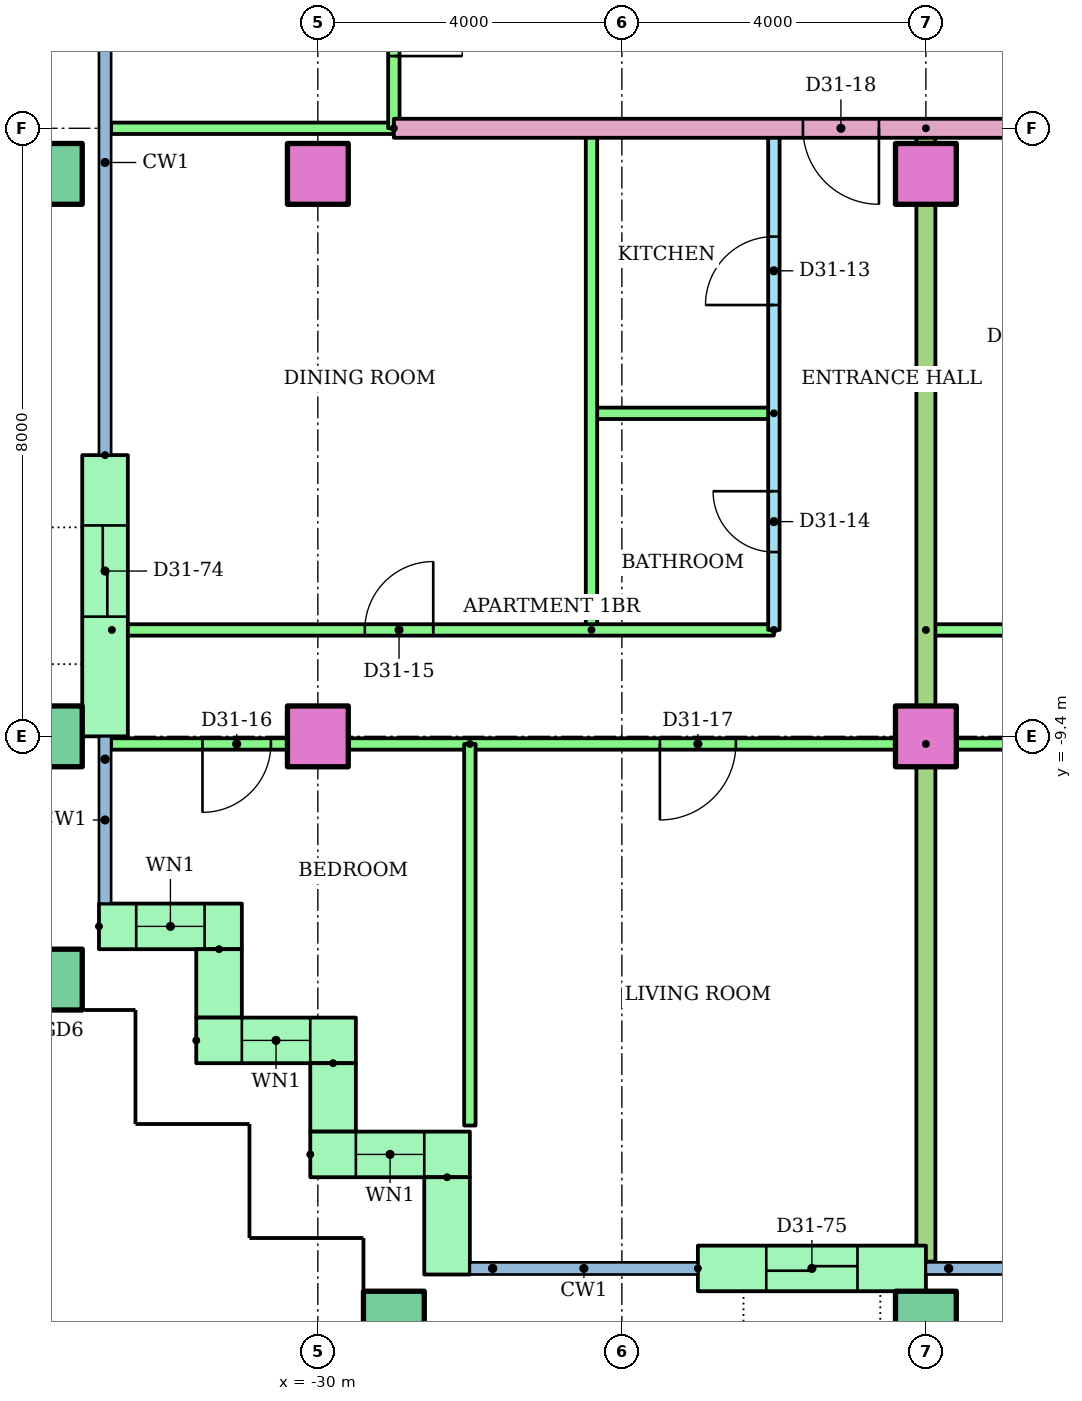
"""IFC4 building model, lengths in metres.
Left out: names, types, materials, properties, quantities, classifications, styles, units other than length and angle.
Written with IfcOpenShell. Run it as: python <this file> out.ifc"""

import sys

from ifc_helpers import new_model, si_unit, direction, frame, frame_2d, origin, origin_2d, place, context, subcontext, project, spatial, rectangle, hollow_rectangle, extrude, element, fill, save


model = new_model("IFC4")
c1 = context("Model", 3, precision=1e-05, world=origin(), true_north=direction((0.0, 1.0)))
c2 = subcontext(c1, "Body", "Model", "MODEL_VIEW")
j1 = project(units=[si_unit("LENGTHUNIT", "METRE"), si_unit("PLANEANGLEUNIT", "RADIAN")], contexts=[c1])
p1 = place(None, origin())
s1 = spatial("IfcSite", under=j1, at=p1, CompositionType="ELEMENT")
p2 = place(p1, origin())
s2 = spatial("IfcBuilding", under=s1, at=p2, CompositionType="ELEMENT")
p3 = place(p2, frame((0.0, 0.0, 123.0)))
s3 = spatial("IfcBuildingStorey", under=s2, at=p3, CompositionType="ELEMENT", Elevation=123.0)
for number, where in (
    (1, (-29.0, -17.1, 0.0)),
    (2, (-22.0, -17.1, 0.0)),
    (3, (-33.5, -12.6, 0.0)),
    (4, (-33.5, -9.4, 0.0)),
):
    element("IfcColumn", number, at=place(p3, frame(where)), inside=s3, PredefinedType="COLUMN", context=c2, shape_type="SweptSolid", body=[
        extrude(hollow_rectangle(XDim=0.8, YDim=0.8, WallThickness=0.04, at=origin_2d()), origin(), (0.0, 0.0, 1.0), 3.2),
    ])
for number, where in (
    (5, (-30.0, -9.4, 0.0)),
    (6, (-22.0, -9.4, 0.0)),
):
    element("IfcColumn", number, at=place(p3, frame(where)), inside=s3, PredefinedType="COLUMN", context=c2, shape_type="SweptSolid", body=[
        extrude(rectangle(XDim=0.8, YDim=0.8, at=origin_2d()), origin(), (0.0, 0.0, 1.0), 3.2),
    ])
p4 = place(p3, frame((-33.5, -2.0, 0.0)))
e7 = element("IfcColumn", 7, at=p4, inside=s3, PredefinedType="COLUMN", context=c2, shape_type="SweptSolid", body=[
    extrude(hollow_rectangle(XDim=0.8, YDim=0.8, WallThickness=0.04, at=origin_2d()), origin(), (0.0, 0.0, 1.0), 3.2),
])
for number, where in (
    (8, (-30.0, -2.0, 0.0)),
    (9, (-22.0, -2.0, 0.0)),
):
    element("IfcColumn", number, at=place(p3, frame(where)), inside=s3, PredefinedType="COLUMN", context=c2, shape_type="SweptSolid", body=[
        extrude(rectangle(XDim=0.8, YDim=0.8, at=origin_2d()), origin(), (0.0, 0.0, 1.0), 3.2),
    ])
p5 = place(p3, frame((-32.8, -5.7, 0.0), z_axis=(0.0, 0.0, 1.0), x_axis=(0.0, -1.0, 0.0)))
e10 = element("IfcWall", 10, at=p5, inside=s3, PredefinedType="STANDARD", context=c2, shape_type="SweptSolid", body=[
    extrude(rectangle(XDim=3.7, YDim=0.6, at=frame_2d((1.85, 0.0))), origin(), (0.0, 0.0, 1.0), 2.92),
])
p6 = place(p5, frame((0.925, 0.0, 0.0)))
e11 = element("IfcOpeningElement", 11, at=p6, cuts=e10, PredefinedType="OPENING", context=c2, shape_type="SweptSolid", body=[
    extrude(rectangle(XDim=1.2, YDim=2.1, at=frame_2d((0.6, 1.05))), frame((0.0, 0.31, 0.0), z_axis=(0.0, -1.0, 0.0), x_axis=(1.0, 0.0, 0.0)), (0.0, 0.0, 1.0), 0.62),
])
p7 = place(p3, frame((-32.88, -11.9, 0.0)))
e12 = element("IfcWall", 12, at=p7, inside=s3, PredefinedType="STANDARD", context=c2, shape_type="SweptSolid", body=[
    extrude(rectangle(XDim=1.88, YDim=0.6, at=frame_2d((0.94, 0.0))), origin(), (0.0, 0.0, 1.0), 2.92),
])
p8 = place(p7, frame((0.49, 0.0, 0.9)))
e13 = element("IfcOpeningElement", 13, at=p8, cuts=e12, PredefinedType="OPENING", context=c2, shape_type="SweptSolid", body=[
    extrude(rectangle(XDim=0.9, YDim=1.5, at=frame_2d((0.45, 0.75))), frame((0.0, 0.31, 0.0), z_axis=(0.0, -1.0, 0.0), x_axis=(1.0, 0.0, 0.0)), (0.0, 0.0, 1.0), 0.62),
])
p9 = place(p3, frame((-31.3, -12.2, 0.0), z_axis=(0.0, 0.0, 1.0), x_axis=(0.0, -1.0, 0.0)))
e14 = element("IfcWall", 14, at=p9, inside=s3, PredefinedType="STANDARD", context=c2, shape_type="SweptSolid", body=[
    extrude(rectangle(XDim=0.9, YDim=0.6, at=frame_2d((0.45, 0.0))), origin(), (0.0, 0.0, 1.0), 2.92),
])
p10 = place(p3, frame((-31.6, -13.4, 0.0)))
e15 = element("IfcWall", 15, at=p10, inside=s3, PredefinedType="STANDARD", context=c2, shape_type="SweptSolid", body=[
    extrude(rectangle(XDim=2.1, YDim=0.6, at=frame_2d((1.05, 0.0))), origin(), (0.0, 0.0, 1.0), 2.92),
])
p11 = place(p10, frame((0.6, 0.0, 0.9)))
e16 = element("IfcOpeningElement", 16, at=p11, cuts=e15, PredefinedType="OPENING", context=c2, shape_type="SweptSolid", body=[
    extrude(rectangle(XDim=0.9, YDim=1.5, at=frame_2d((0.45, 0.75))), frame((0.0, 0.31, 0.0), z_axis=(0.0, -1.0, 0.0), x_axis=(1.0, 0.0, 0.0)), (0.0, 0.0, 1.0), 0.62),
])
p12 = place(p3, frame((-29.8, -13.7, 0.0), z_axis=(0.0, 0.0, 1.0), x_axis=(0.0, -1.0, 0.0)))
e17 = element("IfcWall", 17, at=p12, inside=s3, PredefinedType="STANDARD", context=c2, shape_type="SweptSolid", body=[
    extrude(rectangle(XDim=0.9, YDim=0.6, at=frame_2d((0.45, 0.0))), origin(), (0.0, 0.0, 1.0), 2.92),
])
p13 = place(p3, frame((-30.1, -14.9, 0.0)))
e18 = element("IfcWall", 18, at=p13, inside=s3, PredefinedType="STANDARD", context=c2, shape_type="SweptSolid", body=[
    extrude(rectangle(XDim=2.1, YDim=0.6, at=frame_2d((1.05, 0.0))), origin(), (0.0, 0.0, 1.0), 2.92),
])
p14 = place(p13, frame((0.6, 0.0, 0.9)))
e19 = element("IfcOpeningElement", 19, at=p14, cuts=e18, PredefinedType="OPENING", context=c2, shape_type="SweptSolid", body=[
    extrude(rectangle(XDim=0.9, YDim=1.5, at=frame_2d((0.45, 0.75))), frame((0.0, 0.31, 0.0), z_axis=(0.0, -1.0, 0.0), x_axis=(1.0, 0.0, 0.0)), (0.0, 0.0, 1.0), 0.62),
])
p15 = place(p3, frame((-28.3, -15.2, 0.0), z_axis=(0.0, 0.0, 1.0), x_axis=(0.0, -1.0, 0.0)))
e20 = element("IfcWall", 20, at=p15, inside=s3, PredefinedType="STANDARD", context=c2, shape_type="SweptSolid", body=[
    extrude(rectangle(XDim=1.28, YDim=0.6, at=frame_2d((0.64, 0.0))), origin(), (0.0, 0.0, 1.0), 2.92),
])
p16 = place(p3, frame((-25.0, -16.4, 0.0)))
e21 = element("IfcWall", 21, at=p16, inside=s3, PredefinedType="STANDARD", context=c2, shape_type="SweptSolid", body=[
    extrude(rectangle(XDim=3.0, YDim=0.6, at=frame_2d((1.5, 0.0))), origin(), (0.0, 0.0, 1.0), 2.92),
])
p17 = place(p16, frame((0.9, 0.0, 0.0)))
e22 = element("IfcOpeningElement", 22, at=p17, cuts=e21, PredefinedType="OPENING", context=c2, shape_type="SweptSolid", body=[
    extrude(rectangle(XDim=1.2, YDim=2.1, at=frame_2d((0.6, 1.05))), frame((0.0, 0.31, 0.0), z_axis=(0.0, -1.0, 0.0), x_axis=(1.0, 0.0, 0.0)), (0.0, 0.0, 1.0), 0.62),
])
p18 = place(p3, frame((-24.0, -8.0, 0.0), z_axis=(0.0, 0.0, 1.0), x_axis=(0.0, 1.0, 0.0)))
e23 = element("IfcWall", 23, at=p18, inside=s3, PredefinedType="PARTITIONING", context=c2, shape_type="SweptSolid", body=[
    extrude(rectangle(XDim=6.6, YDim=0.15, at=frame_2d((3.3, 0.0))), origin(), (0.0, 0.0, 1.0), 2.4),
])
p19 = place(p18, frame((4.275, 0.0, 0.0)))
e24 = element("IfcOpeningElement", 24, at=p19, cuts=e23, PredefinedType="OPENING", context=c2, shape_type="SweptSolid", body=[
    extrude(rectangle(XDim=0.9, YDim=2.1, at=frame_2d((0.45, 1.05))), frame((0.0, 0.085, 0.0), z_axis=(0.0, -1.0, 0.0), x_axis=(1.0, 0.0, 0.0)), (0.0, 0.0, 1.0), 0.17),
])
p20 = place(p18, frame((1.025, 0.0, 0.0)))
e25 = element("IfcOpeningElement", 25, at=p20, cuts=e23, PredefinedType="OPENING", context=c2, shape_type="SweptSolid", body=[
    extrude(rectangle(XDim=0.8, YDim=2.1, at=frame_2d((0.4, 1.05))), frame((0.0, 0.085, 0.0), z_axis=(0.0, -1.0, 0.0), x_axis=(1.0, 0.0, 0.0)), (0.0, 0.0, 1.0), 0.17),
])
p21 = place(p3, frame((-24.0, -5.15, 0.0), z_axis=(0.0, 0.0, 1.0), x_axis=(-1.0, 0.0, 0.0)))
e26 = element("IfcWall", 26, at=p21, inside=s3, PredefinedType="PARTITIONING", context=c2, shape_type="SweptSolid", body=[
    extrude(rectangle(XDim=2.4, YDim=0.15, at=frame_2d((1.2, 0.0))), origin(), (0.0, 0.0, 1.0), 2.4),
])
p22 = place(p3, frame((-26.4, -8.0, 0.0), z_axis=(0.0, 0.0, 1.0), x_axis=(0.0, 1.0, 0.0)))
e27 = element("IfcWall", 27, at=p22, inside=s3, PredefinedType="PARTITIONING", context=c2, shape_type="SweptSolid", body=[
    extrude(rectangle(XDim=6.6, YDim=0.15, at=frame_2d((3.3, 0.0))), origin(), (0.0, 0.0, 1.0), 2.4),
])
p23 = place(p3, frame((-32.71, -8.0, 0.0)))
e28 = element("IfcWall", 28, at=p23, inside=s3, PredefinedType="PARTITIONING", context=c2, shape_type="SweptSolid", body=[
    extrude(rectangle(XDim=8.71, YDim=0.15, at=frame_2d((4.355, 0.0))), origin(), (0.0, 0.0, 1.0), 2.4),
])
p24 = place(p23, frame((3.328, 0.0, 0.0)))
e29 = element("IfcOpeningElement", 29, at=p24, cuts=e28, PredefinedType="OPENING", context=c2, shape_type="SweptSolid", body=[
    extrude(rectangle(XDim=0.9, YDim=2.1, at=frame_2d((0.45, 1.05))), frame((0.0, 0.085, 0.0), z_axis=(0.0, -1.0, 0.0), x_axis=(1.0, 0.0, 0.0)), (0.0, 0.0, 1.0), 0.17),
])
p25 = place(p3, frame((-22.0, -9.5, 0.0), z_axis=(0.0, 0.0, 1.0), x_axis=(-1.0, 0.0, 0.0)))
e30 = element("IfcWall", 30, at=p25, inside=s3, PredefinedType="PARTITIONING", context=c2, shape_type="SweptSolid", body=[
    extrude(rectangle(XDim=10.72, YDim=0.15, at=frame_2d((5.36, 0.0))), origin(), (0.0, 0.0, 1.0), 2.4),
])
p26 = place(p25, frame((8.618, 0.0, 0.0)))
e31 = element("IfcOpeningElement", 31, at=p26, cuts=e30, PredefinedType="OPENING", context=c2, shape_type="SweptSolid", body=[
    extrude(rectangle(XDim=0.9, YDim=2.1, at=frame_2d((0.45, 1.05))), frame((0.0, 0.085, 0.0), z_axis=(0.0, -1.0, 0.0), x_axis=(1.0, 0.0, 0.0)), (0.0, 0.0, 1.0), 0.17),
])
p27 = place(p25, frame((2.5, 0.0, 0.0)))
e32 = element("IfcOpeningElement", 32, at=p27, cuts=e30, PredefinedType="OPENING", context=c2, shape_type="SweptSolid", body=[
    extrude(rectangle(XDim=1.0, YDim=2.1, at=frame_2d((0.5, 1.05))), frame((0.0, 0.085, 0.0), z_axis=(0.0, -1.0, 0.0), x_axis=(1.0, 0.0, 0.0)), (0.0, 0.0, 1.0), 0.17),
])
p28 = place(p3, frame((-28.0, -9.5, 0.0), z_axis=(0.0, 0.0, 1.0), x_axis=(0.0, -1.0, 0.0)))
e33 = element("IfcWall", 33, at=p28, inside=s3, PredefinedType="PARTITIONING", context=c2, shape_type="SweptSolid", body=[
    extrude(rectangle(XDim=5.02, YDim=0.15, at=frame_2d((2.51, 0.0))), origin(), (0.0, 0.0, 1.0), 2.4),
])
p29 = place(p3, frame((-22.0, -8.0, 0.0)))
e34 = element("IfcWall", 34, at=p29, inside=s3, PredefinedType="PARTITIONING", context=c2, shape_type="SweptSolid", body=[
    extrude(rectangle(XDim=6.0, YDim=0.15, at=frame_2d((3.0, 0.0))), origin(), (0.0, 0.0, 1.0), 2.4),
])
p30 = place(p29, frame((1.35, 0.0, 0.0)))
e35 = element("IfcOpeningElement", 35, at=p30, cuts=e34, PredefinedType="OPENING", context=c2, shape_type="SweptSolid", body=[
    extrude(rectangle(XDim=0.9, YDim=2.1, at=frame_2d((0.45, 1.05))), frame((0.0, 0.085, 0.0), z_axis=(0.0, -1.0, 0.0), x_axis=(1.0, 0.0, 0.0)), (0.0, 0.0, 1.0), 0.17),
])
p31 = place(p3, frame((-14.0, -9.5, 0.0), z_axis=(0.0, 0.0, 1.0), x_axis=(-1.0, 0.0, 0.0)))
e36 = element("IfcWall", 36, at=p31, inside=s3, PredefinedType="PARTITIONING", context=c2, shape_type="SweptSolid", body=[
    extrude(rectangle(XDim=8.0, YDim=0.15, at=frame_2d((4.0, 0.0))), origin(), (0.0, 0.0, 1.0), 2.4),
])
p32 = place(p31, frame((5.5, 0.0, 0.0)))
e37 = element("IfcOpeningElement", 37, at=p32, cuts=e36, PredefinedType="OPENING", context=c2, shape_type="SweptSolid", body=[
    extrude(rectangle(XDim=1.0, YDim=2.1, at=frame_2d((0.5, 1.05))), frame((0.0, 0.085, 0.0), z_axis=(0.0, -1.0, 0.0), x_axis=(1.0, 0.0, 0.0)), (0.0, 0.0, 1.0), 0.17),
])
p33 = place(p31, frame((1.5, 0.0, 0.0)))
e38 = element("IfcOpeningElement", 38, at=p33, cuts=e36, PredefinedType="OPENING", context=c2, shape_type="SweptSolid", body=[
    extrude(rectangle(XDim=1.0, YDim=2.1, at=frame_2d((0.5, 1.05))), frame((0.0, 0.085, 0.0), z_axis=(0.0, -1.0, 0.0), x_axis=(1.0, 0.0, 0.0)), (0.0, 0.0, 1.0), 0.17),
])
p34 = place(p3, frame((-22.0, -1.4, 0.0), z_axis=(0.0, 0.0, 1.0), x_axis=(0.0, -1.0, 0.0)))
e39 = element("IfcWall", 39, at=p34, inside=s3, PredefinedType="PARTITIONING", context=c2, shape_type="SweptSolid", body=[
    extrude(rectangle(XDim=14.91, YDim=0.25, at=frame_2d((7.455, 0.0))), origin(), (0.0, 0.0, 1.0), 2.4),
])
p35 = place(p3, frame((-14.0, -1.4, 0.0), z_axis=(0.0, 0.0, 1.0), x_axis=(-1.0, 0.0, 0.0)))
e40 = element("IfcWall", 40, at=p35, inside=s3, PredefinedType="PARTITIONING", context=c2, shape_type="SweptSolid", body=[
    extrude(rectangle(XDim=15.0, YDim=0.25, at=frame_2d((7.5, 0.0))), origin(), (0.0, 0.0, 1.0), 2.4),
])
p36 = place(p35, frame((8.618, 0.0, 0.0)))
e41 = element("IfcOpeningElement", 41, at=p36, cuts=e40, PredefinedType="OPENING", context=c2, shape_type="SweptSolid", body=[
    extrude(rectangle(XDim=1.0, YDim=2.1, at=frame_2d((0.5, 1.05))), frame((0.0, 0.135, 0.0), z_axis=(0.0, -1.0, 0.0), x_axis=(1.0, 0.0, 0.0)), (0.0, 0.0, 1.0), 0.27),
])
p37 = place(p35, frame((0.618, 0.0, 0.0)))
e42 = element("IfcOpeningElement", 42, at=p37, cuts=e40, PredefinedType="OPENING", context=c2, shape_type="SweptSolid", body=[
    extrude(rectangle(XDim=1.0, YDim=2.1, at=frame_2d((0.5, 1.05))), frame((0.0, 0.135, 0.0), z_axis=(0.0, -1.0, 0.0), x_axis=(1.0, 0.0, 0.0)), (0.0, 0.0, 1.0), 0.27),
])
p38 = place(p3, frame((-29.0, -1.4, 0.0), z_axis=(0.0, 0.0, 1.0), x_axis=(-1.0, 0.0, 0.0)))
e43 = element("IfcWall", 43, at=p38, inside=s3, PredefinedType="PARTITIONING", context=c2, shape_type="SweptSolid", body=[
    extrude(rectangle(XDim=3.72, YDim=0.15, at=frame_2d((1.86, 0.0))), origin(), (0.0, 0.0, 1.0), 2.4),
])
p39 = place(p3, frame((-29.0, 1.4, 0.0), z_axis=(0.0, 0.0, 1.0), x_axis=(0.0, -1.0, 0.0)))
e44 = element("IfcWall", 44, at=p39, inside=s3, PredefinedType="PARTITIONING", context=c2, shape_type="SweptSolid", body=[
    extrude(rectangle(XDim=2.8, YDim=0.15, at=frame_2d((1.4, 0.0))), origin(), (0.0, 0.0, 1.0), 2.4),
])
p40 = place(p39, frame((0.95, 0.0, 0.0)))
e45 = element("IfcOpeningElement", 45, at=p40, cuts=e44, PredefinedType="OPENING", context=c2, shape_type="SweptSolid", body=[
    extrude(rectangle(XDim=0.9, YDim=2.1, at=frame_2d((0.45, 1.05))), frame((0.0, 0.085, 0.0), z_axis=(0.0, -1.0, 0.0), x_axis=(1.0, 0.0, 0.0)), (0.0, 0.0, 1.0), 0.17),
])
p41 = place(p8, origin())
e46 = element("IfcWindow", 46, at=p41, inside=s3, PartitioningType="SINGLE_PANEL", PredefinedType="WINDOW", context=c2, shape_type="SweptSolid", body=[
    extrude(rectangle(XDim=0.9, YDim=1.5, at=frame_2d((0.45, 0.75))), frame((0.0, 0.03, 0.0), z_axis=(0.0, -1.0, 0.0), x_axis=(1.0, 0.0, 0.0)), (0.0, 0.0, 1.0), 0.06),
])
fill(e13, e46)
p42 = place(p11, origin())
e47 = element("IfcWindow", 47, at=p42, inside=s3, PartitioningType="SINGLE_PANEL", PredefinedType="WINDOW", context=c2, shape_type="SweptSolid", body=[
    extrude(rectangle(XDim=0.9, YDim=1.5, at=frame_2d((0.45, 0.75))), frame((0.0, 0.03, 0.0), z_axis=(0.0, -1.0, 0.0), x_axis=(1.0, 0.0, 0.0)), (0.0, 0.0, 1.0), 0.06),
])
fill(e16, e47)
p43 = place(p14, origin())
e48 = element("IfcWindow", 48, at=p43, inside=s3, PartitioningType="SINGLE_PANEL", PredefinedType="WINDOW", context=c2, shape_type="SweptSolid", body=[
    extrude(rectangle(XDim=0.9, YDim=1.5, at=frame_2d((0.45, 0.75))), frame((0.0, 0.03, 0.0), z_axis=(0.0, -1.0, 0.0), x_axis=(1.0, 0.0, 0.0)), (0.0, 0.0, 1.0), 0.06),
])
fill(e19, e48)
p44 = place(p19, origin())
e49 = element("IfcDoor", 49, at=p44, inside=s3, OperationType="SINGLE_SWING_LEFT", PredefinedType="DOOR", context=c2, shape_type="SweptSolid", body=[
    extrude(rectangle(XDim=0.9, YDim=2.1, at=frame_2d((0.45, 1.05))), frame((0.0, 0.025, 0.0), z_axis=(0.0, -1.0, 0.0), x_axis=(1.0, 0.0, 0.0)), (0.0, 0.0, 1.0), 0.05),
])
fill(e24, e49)
p45 = place(p20, origin())
e50 = element("IfcDoor", 50, at=p45, inside=s3, OperationType="SINGLE_SWING_RIGHT", PredefinedType="DOOR", context=c2, shape_type="SweptSolid", body=[
    extrude(rectangle(XDim=0.8, YDim=2.1, at=frame_2d((0.4, 1.05))), frame((0.0, 0.025, 0.0), z_axis=(0.0, -1.0, 0.0), x_axis=(1.0, 0.0, 0.0)), (0.0, 0.0, 1.0), 0.05),
])
fill(e25, e50)
p46 = place(p24, origin())
e51 = element("IfcDoor", 51, at=p46, inside=s3, OperationType="SINGLE_SWING_RIGHT", PredefinedType="DOOR", context=c2, shape_type="SweptSolid", body=[
    extrude(rectangle(XDim=0.9, YDim=2.1, at=frame_2d((0.45, 1.05))), frame((0.0, 0.025, 0.0), z_axis=(0.0, -1.0, 0.0), x_axis=(1.0, 0.0, 0.0)), (0.0, 0.0, 1.0), 0.05),
])
fill(e29, e51)
p47 = place(p26, origin())
e52 = element("IfcDoor", 52, at=p47, inside=s3, OperationType="SINGLE_SWING_RIGHT", PredefinedType="DOOR", context=c2, shape_type="SweptSolid", body=[
    extrude(rectangle(XDim=0.9, YDim=2.1, at=frame_2d((0.45, 1.05))), frame((0.0, 0.025, 0.0), z_axis=(0.0, -1.0, 0.0), x_axis=(1.0, 0.0, 0.0)), (0.0, 0.0, 1.0), 0.05),
])
fill(e31, e52)
p48 = place(p27, origin())
e53 = element("IfcDoor", 53, at=p48, inside=s3, OperationType="SINGLE_SWING_RIGHT", PredefinedType="DOOR", context=c2, shape_type="SweptSolid", body=[
    extrude(rectangle(XDim=1.0, YDim=2.1, at=frame_2d((0.5, 1.05))), frame((0.0, 0.025, 0.0), z_axis=(0.0, -1.0, 0.0), x_axis=(1.0, 0.0, 0.0)), (0.0, 0.0, 1.0), 0.05),
])
fill(e32, e53)
p49 = place(p36, origin())
e54 = element("IfcDoor", 54, at=p49, inside=s3, OperationType="SINGLE_SWING_LEFT", PredefinedType="DOOR", context=c2, shape_type="SweptSolid", body=[
    extrude(rectangle(XDim=1.0, YDim=2.1, at=frame_2d((0.5, 1.05))), frame((0.0, 0.025, 0.0), z_axis=(0.0, -1.0, 0.0), x_axis=(1.0, 0.0, 0.0)), (0.0, 0.0, 1.0), 0.05),
])
fill(e41, e54)
p50 = place(p40, origin())
e55 = element("IfcDoor", 55, at=p50, inside=s3, OperationType="SINGLE_SWING_RIGHT", PredefinedType="DOOR", context=c2, shape_type="SweptSolid", body=[
    extrude(rectangle(XDim=0.9, YDim=2.1, at=frame_2d((0.45, 1.05))), frame((0.0, 0.025, 0.0), z_axis=(0.0, -1.0, 0.0), x_axis=(1.0, 0.0, 0.0)), (0.0, 0.0, 1.0), 0.05),
])
fill(e45, e55)
p51 = place(p6, origin())
e56 = element("IfcDoor", 56, at=p51, inside=s3, OperationType="SLIDING_TO_LEFT", PredefinedType="DOOR", context=c2, shape_type="SweptSolid", body=[
    extrude(rectangle(XDim=1.2, YDim=2.1, at=frame_2d((0.6, 1.05))), frame((0.0, 0.025, 0.0), z_axis=(0.0, -1.0, 0.0), x_axis=(1.0, 0.0, 0.0)), (0.0, 0.0, 1.0), 0.05),
])
fill(e11, e56)
p52 = place(p17, origin())
e57 = element("IfcDoor", 57, at=p52, inside=s3, OperationType="SLIDING_TO_LEFT", PredefinedType="DOOR", context=c2, shape_type="SweptSolid", body=[
    extrude(rectangle(XDim=1.2, YDim=2.1, at=frame_2d((0.6, 1.05))), frame((0.0, 0.025, 0.0), z_axis=(0.0, -1.0, 0.0), x_axis=(1.0, 0.0, 0.0)), (0.0, 0.0, 1.0), 0.05),
])
fill(e22, e57)
save(model, sys.argv[1])
